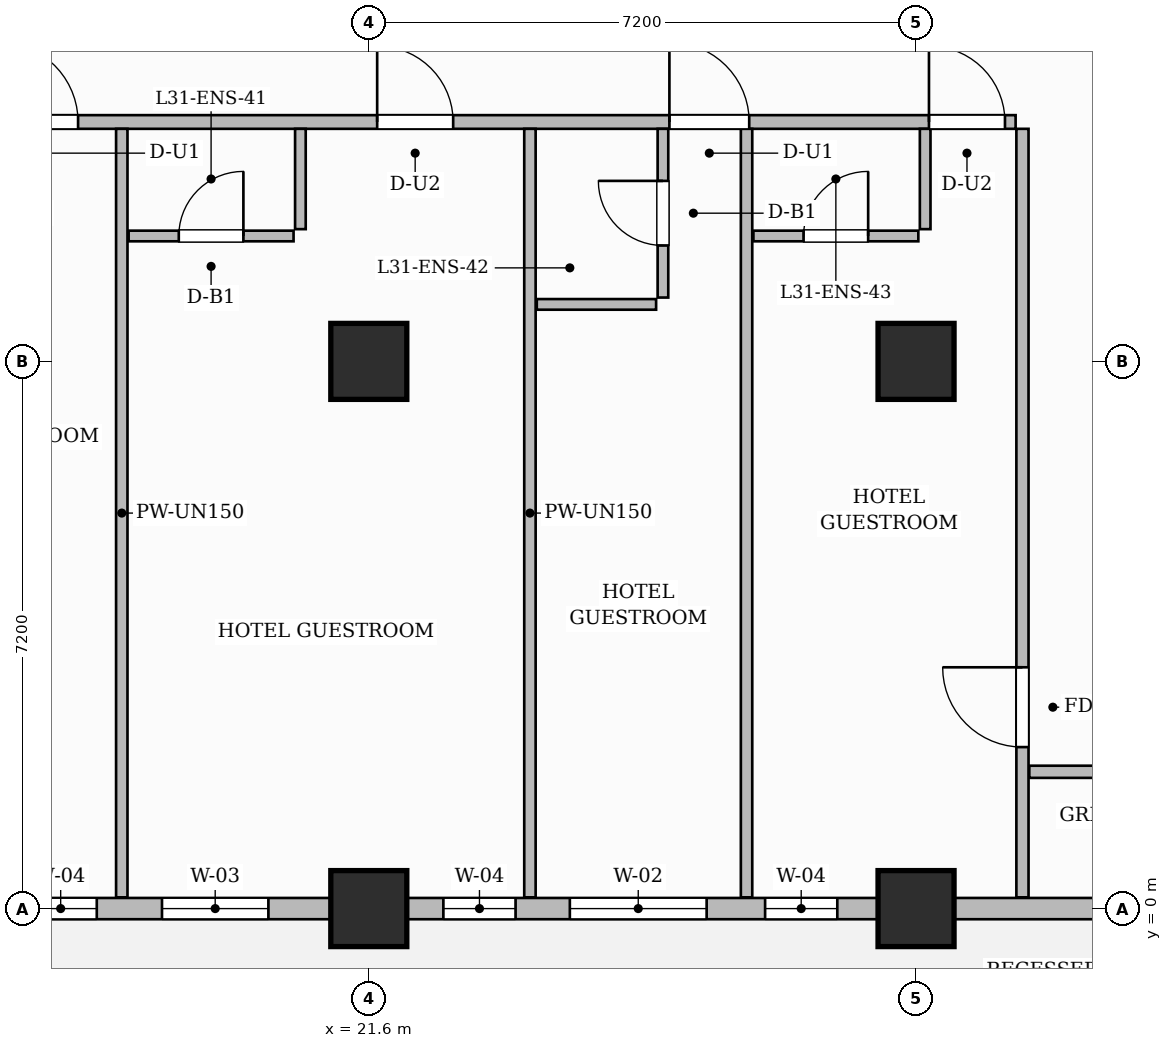
"""IFC4 building model, lengths in metres.
Left out: names, types, materials, properties, quantities, classifications, styles, units other than length and angle.
Written with IfcOpenShell. Run it as: python <this file> out.ifc"""

import sys

from ifc_helpers import new_model, si_unit, direction, frame, frame_2d, origin, origin_2d, place, context, subcontext, project, spatial, rectangle, extrude, source, transform, mapped, element, fill, save


model = new_model("IFC4")
c1 = context("Model", 3, precision=1e-05, world=origin(), true_north=direction((0.0, 1.0)))
c2 = subcontext(c1, "Body", "Model", "MODEL_VIEW")
j1 = project(units=[si_unit("LENGTHUNIT", "METRE"), si_unit("PLANEANGLEUNIT", "RADIAN")], contexts=[c1])
p1 = place(None, origin())
s1 = spatial("IfcSite", under=j1, at=p1, CompositionType="ELEMENT")
p2 = place(p1, origin())
s2 = spatial("IfcBuilding", under=s1, at=p2, CompositionType="ELEMENT")
p3 = place(p2, frame((0.0, 0.0, 126.6)))
s3 = spatial("IfcBuildingStorey", under=s2, at=p3, CompositionType="ELEMENT", Elevation=126.6)
m1 = source(origin(), c2, "Body", "SweptSolid", [
    extrude(rectangle(XDim=1.0, YDim=1.0, at=origin_2d()), origin(), (0.0, 0.0, 1.0), 3.7),
])
for number, where, z_axis, x_axis in (
    (1, (21.6, 0.0, 0.0), (0.0, 0.0, 1.0), (1.0, 0.0, 0.0)),
    (2, (21.6, 7.2, 0.0), (0.0, 0.0, 1.0), (1.0, 0.0, 0.0)),
    (3, (28.8, 0.0, 0.0), (0.0, 0.0, 1.0), (1.0, 0.0, 0.0)),
    (4, (28.8, 7.2, 0.0), (0.0, 0.0, 1.0), (1.0, 0.0, 0.0)),
):
    element("IfcColumn", number, at=place(p3, frame(where, z_axis=z_axis, x_axis=x_axis)), inside=s3, PredefinedType="COLUMN", context=c2, shape_type="MappedRepresentation", body=[
        mapped(m1, transform((0.0, 0.0, 0.0), scale=1.0)),
    ])
p4 = place(p3, frame((14.548, 10.35, 0.0), z_axis=(0.0, 0.0, 1.0), x_axis=(1.0, 0.0, 0.0)))
e5 = element("IfcWall", 5, at=p4, inside=s3, PredefinedType="PARTITIONING", context=c2, shape_type="SweptSolid", body=[
    extrude(rectangle(XDim=15.562, YDim=0.18, at=frame_2d((7.781, 0.0))), origin(), (0.0, 0.0, 1.0), 3.45),
])
p5 = place(p4, frame((2.177, 0.0, 0.0)))
e6 = element("IfcOpeningElement", 6, at=p5, cuts=e5, PredefinedType="OPENING", context=c2, shape_type="SweptSolid", body=[
    extrude(rectangle(XDim=1.05, YDim=2.25, at=frame_2d((0.525, 1.125))), frame((0.0, 0.1, 0.0), z_axis=(0.0, -1.0, 0.0), x_axis=(1.0, 0.0, 0.0)), (0.0, 0.0, 1.0), 0.2),
])
p6 = place(p4, frame((7.162, 0.0, 0.0)))
e7 = element("IfcOpeningElement", 7, at=p6, cuts=e5, PredefinedType="OPENING", context=c2, shape_type="SweptSolid", body=[
    extrude(rectangle(XDim=1.0, YDim=2.2, at=frame_2d((0.5, 1.1))), frame((0.0, 0.1, 0.0), z_axis=(0.0, -1.0, 0.0), x_axis=(1.0, 0.0, 0.0)), (0.0, 0.0, 1.0), 0.2),
])
p7 = place(p4, frame((11.007, 0.0, 0.0)))
e8 = element("IfcOpeningElement", 8, at=p7, cuts=e5, PredefinedType="OPENING", context=c2, shape_type="SweptSolid", body=[
    extrude(rectangle(XDim=1.05, YDim=2.25, at=frame_2d((0.525, 1.125))), frame((0.0, 0.1, 0.0), z_axis=(0.0, -1.0, 0.0), x_axis=(1.0, 0.0, 0.0)), (0.0, 0.0, 1.0), 0.2),
])
p8 = place(p4, frame((14.422, 0.0, 0.0)))
e9 = element("IfcOpeningElement", 9, at=p8, cuts=e5, PredefinedType="OPENING", context=c2, shape_type="SweptSolid", body=[
    extrude(rectangle(XDim=1.0, YDim=2.2, at=frame_2d((0.5, 1.1))), frame((0.0, 0.1, 0.0), z_axis=(0.0, -1.0, 0.0), x_axis=(1.0, 0.0, 0.0)), (0.0, 0.0, 1.0), 0.2),
])
p9 = place(p3, frame((30.2, 0.148, 0.0), z_axis=(0.0, 0.0, 1.0), x_axis=(0.0, 1.0, 0.0)))
e10 = element("IfcWall", 10, at=p9, inside=s3, PredefinedType="PARTITIONING", context=c2, shape_type="SweptSolid", body=[
    extrude(rectangle(XDim=10.112, YDim=0.16, at=frame_2d((5.056, 0.0))), origin(), (0.0, 0.0, 1.0), 3.45),
])
p10 = place(p9, frame((1.977, 0.0, 0.0)))
e11 = element("IfcOpeningElement", 11, at=p10, cuts=e10, PredefinedType="OPENING", context=c2, shape_type="SweptSolid", body=[
    extrude(rectangle(XDim=1.05, YDim=2.15, at=frame_2d((0.525, 1.075))), frame((0.0, 0.09, 0.0), z_axis=(0.0, -1.0, 0.0), x_axis=(1.0, 0.0, 0.0)), (0.0, 0.0, 1.0), 0.18),
])
p11 = place(p3, frame((30.29, 1.8, 0.0), z_axis=(0.0, 0.0, 1.0), x_axis=(1.0, 0.0, 0.0)))
e12 = element("IfcWall", 12, at=p11, inside=s3, PredefinedType="PARTITIONING", context=c2, shape_type="SweptSolid", body=[
    extrude(rectangle(XDim=19.37, YDim=0.16, at=frame_2d((9.685, 0.0))), origin(), (0.0, 0.0, 1.0), 3.45),
])
p12 = place(p11, frame((9.735, 0.0, 0.0)))
e13 = element("IfcOpeningElement", 13, at=p12, cuts=e12, PredefinedType="OPENING", context=c2, shape_type="SweptSolid", body=[
    extrude(rectangle(XDim=0.95, YDim=2.15, at=frame_2d((0.475, 1.075))), frame((0.0, 0.09, 0.0), z_axis=(0.0, -1.0, 0.0), x_axis=(1.0, 0.0, 0.0)), (0.0, 0.0, 1.0), 0.18),
])
p13 = place(p3, frame((18.35, 0.148, 0.0), z_axis=(0.0, 0.0, 1.0), x_axis=(0.0, 1.0, 0.0)))
e14 = element("IfcWall", 14, at=p13, inside=s3, PredefinedType="PARTITIONING", context=c2, shape_type="SweptSolid", body=[
    extrude(rectangle(XDim=10.112, YDim=0.15, at=frame_2d((5.056, 0.0))), origin(), (0.0, 0.0, 1.0), 3.45),
])
p14 = place(p3, frame((20.7, 8.94, 0.0), z_axis=(0.0, 0.0, 1.0), x_axis=(0.0, 1.0, 0.0)))
e15 = element("IfcWall", 15, at=p14, inside=s3, PredefinedType="PARTITIONING", context=c2, shape_type="SweptSolid", body=[
    extrude(rectangle(XDim=1.32, YDim=0.14, at=frame_2d((0.66, 0.0))), origin(), (0.0, 0.0, 1.0), 3.45),
])
p15 = place(p3, frame((18.44, 8.85, 0.0), z_axis=(0.0, 0.0, 1.0), x_axis=(1.0, 0.0, 0.0)))
e16 = element("IfcWall", 16, at=p15, inside=s3, PredefinedType="PARTITIONING", context=c2, shape_type="SweptSolid", body=[
    extrude(rectangle(XDim=2.17, YDim=0.14, at=frame_2d((1.085, 0.0))), origin(), (0.0, 0.0, 1.0), 3.45),
])
p16 = place(p15, frame((0.66, 0.0, 0.0)))
e17 = element("IfcOpeningElement", 17, at=p16, cuts=e16, PredefinedType="OPENING", context=c2, shape_type="SweptSolid", body=[
    extrude(rectangle(XDim=0.85, YDim=2.1, at=frame_2d((0.425, 1.05))), frame((0.0, 0.08, 0.0), z_axis=(0.0, -1.0, 0.0), x_axis=(1.0, 0.0, 0.0)), (0.0, 0.0, 1.0), 0.16),
])
p17 = place(p3, frame((23.72, 0.148, 0.0), z_axis=(0.0, 0.0, 1.0), x_axis=(0.0, 1.0, 0.0)))
e18 = element("IfcWall", 18, at=p17, inside=s3, PredefinedType="PARTITIONING", context=c2, shape_type="SweptSolid", body=[
    extrude(rectangle(XDim=10.112, YDim=0.15, at=frame_2d((5.056, 0.0))), origin(), (0.0, 0.0, 1.0), 3.45),
])
p18 = place(p3, frame((25.47, 8.04, 0.0), z_axis=(0.0, 0.0, 1.0), x_axis=(0.0, 1.0, 0.0)))
e19 = element("IfcWall", 19, at=p18, inside=s3, PredefinedType="PARTITIONING", context=c2, shape_type="SweptSolid", body=[
    extrude(rectangle(XDim=2.22, YDim=0.14, at=frame_2d((1.11, 0.0))), origin(), (0.0, 0.0, 1.0), 3.45),
])
p19 = place(p18, frame((0.685, 0.0, 0.0)))
e20 = element("IfcOpeningElement", 20, at=p19, cuts=e19, PredefinedType="OPENING", context=c2, shape_type="SweptSolid", body=[
    extrude(rectangle(XDim=0.85, YDim=2.1, at=frame_2d((0.425, 1.05))), frame((0.0, 0.08, 0.0), z_axis=(0.0, -1.0, 0.0), x_axis=(1.0, 0.0, 0.0)), (0.0, 0.0, 1.0), 0.16),
])
p20 = place(p3, frame((23.81, 7.95, 0.0), z_axis=(0.0, 0.0, 1.0), x_axis=(1.0, 0.0, 0.0)))
e21 = element("IfcWall", 21, at=p20, inside=s3, PredefinedType="PARTITIONING", context=c2, shape_type="SweptSolid", body=[
    extrude(rectangle(XDim=1.57, YDim=0.14, at=frame_2d((0.785, 0.0))), origin(), (0.0, 0.0, 1.0), 3.45),
])
p21 = place(p3, frame((26.57, 0.148, 0.0), z_axis=(0.0, 0.0, 1.0), x_axis=(0.0, 1.0, 0.0)))
e22 = element("IfcWall", 22, at=p21, inside=s3, PredefinedType="PARTITIONING", context=c2, shape_type="SweptSolid", body=[
    extrude(rectangle(XDim=10.112, YDim=0.15, at=frame_2d((5.056, 0.0))), origin(), (0.0, 0.0, 1.0), 3.45),
])
p22 = place(p3, frame((28.92, 8.94, 0.0), z_axis=(0.0, 0.0, 1.0), x_axis=(0.0, 1.0, 0.0)))
e23 = element("IfcWall", 23, at=p22, inside=s3, PredefinedType="PARTITIONING", context=c2, shape_type="SweptSolid", body=[
    extrude(rectangle(XDim=1.32, YDim=0.14, at=frame_2d((0.66, 0.0))), origin(), (0.0, 0.0, 1.0), 2.935),
])
p23 = place(p3, frame((26.66, 8.85, 0.0), z_axis=(0.0, 0.0, 1.0), x_axis=(1.0, 0.0, 0.0)))
e24 = element("IfcWall", 24, at=p23, inside=s3, PredefinedType="PARTITIONING", context=c2, shape_type="SweptSolid", body=[
    extrude(rectangle(XDim=2.17, YDim=0.14, at=frame_2d((1.085, 0.0))), origin(), (0.0, 0.0, 1.0), 3.45),
])
p24 = place(p23, frame((0.66, 0.0, 0.0)))
e25 = element("IfcOpeningElement", 25, at=p24, cuts=e24, PredefinedType="OPENING", context=c2, shape_type="SweptSolid", body=[
    extrude(rectangle(XDim=0.85, YDim=2.1, at=frame_2d((0.425, 1.05))), frame((0.0, 0.08, 0.0), z_axis=(0.0, -1.0, 0.0), x_axis=(1.0, 0.0, 0.0)), (0.0, 0.0, 1.0), 0.16),
])
p25 = place(p3, frame((14.4, 0.0, 0.0), z_axis=(0.0, 0.0, 1.0), x_axis=(1.0, 0.0, 0.0)))
e26 = element("IfcWall", 26, at=p25, inside=s3, PredefinedType="SOLIDWALL", context=c2, shape_type="SweptSolid", body=[
    extrude(rectangle(XDim=35.4, YDim=0.28, at=frame_2d((17.7, 0.0))), origin(), (0.0, 0.0, 1.0), 2.935),
])
p26 = place(p25, frame((0.85, 0.0, 0.0)))
e27 = element("IfcOpeningElement", 27, at=p26, cuts=e26, PredefinedType="OPENING", context=c2, shape_type="SweptSolid", body=[
    extrude(rectangle(XDim=1.2, YDim=2.2, at=frame_2d((0.6, 1.1))), frame((0.0, 0.15, 0.0), z_axis=(0.0, -1.0, 0.0), x_axis=(1.0, 0.0, 0.0)), (0.0, 0.0, 1.0), 0.3),
])
p27 = place(p25, frame((2.671, 0.0, 0.8)))
e28 = element("IfcOpeningElement", 28, at=p27, cuts=e26, PredefinedType="OPENING", context=c2, shape_type="SweptSolid", body=[
    extrude(rectangle(XDim=0.95, YDim=1.75, at=frame_2d((0.475, 0.875))), frame((0.0, 0.15, 0.0), z_axis=(0.0, -1.0, 0.0), x_axis=(1.0, 0.0, 0.0)), (0.0, 0.0, 1.0), 0.3),
])
p28 = place(p25, frame((4.479, 0.0, 0.8)))
e29 = element("IfcOpeningElement", 29, at=p28, cuts=e26, PredefinedType="OPENING", context=c2, shape_type="SweptSolid", body=[
    extrude(rectangle(XDim=1.4, YDim=1.85, at=frame_2d((0.7, 0.925))), frame((0.0, 0.15, 0.0), z_axis=(0.0, -1.0, 0.0), x_axis=(1.0, 0.0, 0.0)), (0.0, 0.0, 1.0), 0.3),
])
p29 = place(p25, frame((8.181, 0.0, 0.8)))
e30 = element("IfcOpeningElement", 30, at=p29, cuts=e26, PredefinedType="OPENING", context=c2, shape_type="SweptSolid", body=[
    extrude(rectangle(XDim=0.95, YDim=1.75, at=frame_2d((0.475, 0.875))), frame((0.0, 0.15, 0.0), z_axis=(0.0, -1.0, 0.0), x_axis=(1.0, 0.0, 0.0)), (0.0, 0.0, 1.0), 0.3),
])
p30 = place(p25, frame((9.845, 0.0, 0.8)))
e31 = element("IfcOpeningElement", 31, at=p30, cuts=e26, PredefinedType="OPENING", context=c2, shape_type="SweptSolid", body=[
    extrude(rectangle(XDim=1.8, YDim=1.85, at=frame_2d((0.9, 0.925))), frame((0.0, 0.15, 0.0), z_axis=(0.0, -1.0, 0.0), x_axis=(1.0, 0.0, 0.0)), (0.0, 0.0, 1.0), 0.3),
])
p31 = place(p25, frame((12.414, 0.0, 0.8)))
e32 = element("IfcOpeningElement", 32, at=p31, cuts=e26, PredefinedType="OPENING", context=c2, shape_type="SweptSolid", body=[
    extrude(rectangle(XDim=0.95, YDim=1.75, at=frame_2d((0.475, 0.875))), frame((0.0, 0.15, 0.0), z_axis=(0.0, -1.0, 0.0), x_axis=(1.0, 0.0, 0.0)), (0.0, 0.0, 1.0), 0.3),
])
p32 = place(p25, frame((16.804, 0.0, 0.8)))
e33 = element("IfcOpeningElement", 33, at=p32, cuts=e26, PredefinedType="OPENING", context=c2, shape_type="SweptSolid", body=[
    extrude(rectangle(XDim=1.8, YDim=1.85, at=frame_2d((0.9, 0.925))), frame((0.0, 0.15, 0.0), z_axis=(0.0, -1.0, 0.0), x_axis=(1.0, 0.0, 0.0)), (0.0, 0.0, 1.0), 0.3),
])
p33 = place(p25, frame((21.725, 0.0, 0.8)))
e34 = element("IfcOpeningElement", 34, at=p33, cuts=e26, PredefinedType="OPENING", context=c2, shape_type="SweptSolid", body=[
    extrude(rectangle(XDim=1.8, YDim=1.85, at=frame_2d((0.9, 0.925))), frame((0.0, 0.15, 0.0), z_axis=(0.0, -1.0, 0.0), x_axis=(1.0, 0.0, 0.0)), (0.0, 0.0, 1.0), 0.3),
])
p34 = place(p25, frame((24.475, 0.0, 0.8)))
e35 = element("IfcOpeningElement", 35, at=p34, cuts=e26, PredefinedType="OPENING", context=c2, shape_type="SweptSolid", body=[
    extrude(rectangle(XDim=1.8, YDim=1.85, at=frame_2d((0.9, 0.925))), frame((0.0, 0.15, 0.0), z_axis=(0.0, -1.0, 0.0), x_axis=(1.0, 0.0, 0.0)), (0.0, 0.0, 1.0), 0.3),
])
p35 = place(p25, frame((29.075, 0.0, 0.8)))
e36 = element("IfcOpeningElement", 36, at=p35, cuts=e26, PredefinedType="OPENING", context=c2, shape_type="SweptSolid", body=[
    extrude(rectangle(XDim=1.8, YDim=1.85, at=frame_2d((0.9, 0.925))), frame((0.0, 0.15, 0.0), z_axis=(0.0, -1.0, 0.0), x_axis=(1.0, 0.0, 0.0)), (0.0, 0.0, 1.0), 0.3),
])
p36 = place(p25, frame((32.125, 0.0, 0.8)))
e37 = element("IfcOpeningElement", 37, at=p36, cuts=e26, PredefinedType="OPENING", context=c2, shape_type="SweptSolid", body=[
    extrude(rectangle(XDim=1.8, YDim=1.85, at=frame_2d((0.9, 0.925))), frame((0.0, 0.15, 0.0), z_axis=(0.0, -1.0, 0.0), x_axis=(1.0, 0.0, 0.0)), (0.0, 0.0, 1.0), 0.3),
])
m2 = source(origin(), c2, "Body", "SweptSolid", [
    extrude(rectangle(XDim=1.05, YDim=2.15, at=frame_2d((0.525, 1.075))), frame((0.0, 0.025, 0.0), z_axis=(0.0, -1.0, 0.0), x_axis=(1.0, 0.0, 0.0)), (0.0, 0.0, 1.0), 0.05),
])
p37 = place(p10, origin())
e38 = element("IfcDoor", 38, at=p37, inside=s3, OperationType="SINGLE_SWING_RIGHT", PredefinedType="DOOR", context=c2, shape_type="MappedRepresentation", body=[
    mapped(m2, transform((0.0, 0.0, 0.0), scale=1.0)),
])
fill(e11, e38)
m3 = source(origin(), c2, "Body", "SweptSolid", [
    extrude(rectangle(XDim=1.05, YDim=2.25, at=frame_2d((0.525, 1.125))), frame((0.0, 0.025, 0.0), z_axis=(0.0, -1.0, 0.0), x_axis=(1.0, 0.0, 0.0)), (0.0, 0.0, 1.0), 0.05),
])
p38 = place(p5, origin())
e39 = element("IfcDoor", 39, at=p38, inside=s3, OperationType="SINGLE_SWING_LEFT", PredefinedType="DOOR", context=c2, shape_type="MappedRepresentation", body=[
    mapped(m3, transform((0.0, 0.0, 0.0), scale=1.0)),
])
fill(e6, e39)
m4 = source(origin(), c2, "Body", "SweptSolid", [
    extrude(rectangle(XDim=0.85, YDim=2.1, at=frame_2d((0.425, 1.05))), frame((0.0, 0.025, 0.0), z_axis=(0.0, -1.0, 0.0), x_axis=(1.0, 0.0, 0.0)), (0.0, 0.0, 1.0), 0.05),
])
p39 = place(p16, origin())
e40 = element("IfcDoor", 40, at=p39, inside=s3, OperationType="SINGLE_SWING_RIGHT", PredefinedType="DOOR", context=c2, shape_type="MappedRepresentation", body=[
    mapped(m4, transform((0.0, 0.0, 0.0), scale=1.0)),
])
fill(e17, e40)
m5 = source(origin(), c2, "Body", "SweptSolid", [
    extrude(rectangle(XDim=1.0, YDim=2.2, at=frame_2d((0.5, 1.1))), frame((0.0, 0.025, 0.0), z_axis=(0.0, -1.0, 0.0), x_axis=(1.0, 0.0, 0.0)), (0.0, 0.0, 1.0), 0.05),
])
p40 = place(p6, origin())
e41 = element("IfcDoor", 41, at=p40, inside=s3, OperationType="SINGLE_SWING_LEFT", PredefinedType="DOOR", context=c2, shape_type="MappedRepresentation", body=[
    mapped(m5, transform((0.0, 0.0, 0.0), scale=1.0)),
])
fill(e7, e41)
p41 = place(p19, origin())
e42 = element("IfcDoor", 42, at=p41, inside=s3, OperationType="SINGLE_SWING_RIGHT", PredefinedType="DOOR", context=c2, shape_type="MappedRepresentation", body=[
    mapped(m4, transform((0.0, 0.0, 0.0), scale=1.0)),
])
fill(e20, e42)
p42 = place(p7, origin())
e43 = element("IfcDoor", 43, at=p42, inside=s3, OperationType="SINGLE_SWING_LEFT", PredefinedType="DOOR", context=c2, shape_type="MappedRepresentation", body=[
    mapped(m3, transform((0.0, 0.0, 0.0), scale=1.0)),
])
fill(e8, e43)
p43 = place(p24, origin())
e44 = element("IfcDoor", 44, at=p43, inside=s3, OperationType="SINGLE_SWING_RIGHT", PredefinedType="DOOR", context=c2, shape_type="MappedRepresentation", body=[
    mapped(m4, transform((0.0, 0.0, 0.0), scale=1.0)),
])
fill(e25, e44)
p44 = place(p8, origin())
e45 = element("IfcDoor", 45, at=p44, inside=s3, OperationType="SINGLE_SWING_LEFT", PredefinedType="DOOR", context=c2, shape_type="MappedRepresentation", body=[
    mapped(m5, transform((0.0, 0.0, 0.0), scale=1.0)),
])
fill(e9, e45)
m6 = source(origin(), c2, "Body", "SweptSolid", [
    extrude(rectangle(XDim=0.95, YDim=1.75, at=frame_2d((0.475, 0.875))), frame((0.0, 0.03, 0.0), z_axis=(0.0, -1.0, 0.0), x_axis=(1.0, 0.0, 0.0)), (0.0, 0.0, 1.0), 0.06),
])
p45 = place(p27, origin())
e46 = element("IfcWindow", 46, at=p45, inside=s3, PartitioningType="SINGLE_PANEL", PredefinedType="WINDOW", context=c2, shape_type="MappedRepresentation", body=[
    mapped(m6, transform((0.0, 0.0, 0.0), scale=1.0)),
])
fill(e28, e46)
m7 = source(origin(), c2, "Body", "SweptSolid", [
    extrude(rectangle(XDim=1.4, YDim=1.85, at=frame_2d((0.7, 0.925))), frame((0.0, 0.03, 0.0), z_axis=(0.0, -1.0, 0.0), x_axis=(1.0, 0.0, 0.0)), (0.0, 0.0, 1.0), 0.06),
])
p46 = place(p28, origin())
e47 = element("IfcWindow", 47, at=p46, inside=s3, PartitioningType="SINGLE_PANEL", PredefinedType="WINDOW", context=c2, shape_type="MappedRepresentation", body=[
    mapped(m7, transform((0.0, 0.0, 0.0), scale=1.0)),
])
fill(e29, e47)
p47 = place(p29, origin())
e48 = element("IfcWindow", 48, at=p47, inside=s3, PartitioningType="SINGLE_PANEL", PredefinedType="WINDOW", context=c2, shape_type="MappedRepresentation", body=[
    mapped(m6, transform((0.0, 0.0, 0.0), scale=1.0)),
])
fill(e30, e48)
m8 = source(origin(), c2, "Body", "SweptSolid", [
    extrude(rectangle(XDim=1.8, YDim=1.85, at=frame_2d((0.9, 0.925))), frame((0.0, 0.03, 0.0), z_axis=(0.0, -1.0, 0.0), x_axis=(1.0, 0.0, 0.0)), (0.0, 0.0, 1.0), 0.06),
])
p48 = place(p30, origin())
e49 = element("IfcWindow", 49, at=p48, inside=s3, PartitioningType="DOUBLE_PANEL_VERTICAL", PredefinedType="WINDOW", context=c2, shape_type="MappedRepresentation", body=[
    mapped(m8, transform((0.0, 0.0, 0.0), scale=1.0)),
])
fill(e31, e49)
p49 = place(p31, origin())
e50 = element("IfcWindow", 50, at=p49, inside=s3, PartitioningType="SINGLE_PANEL", PredefinedType="WINDOW", context=c2, shape_type="MappedRepresentation", body=[
    mapped(m6, transform((0.0, 0.0, 0.0), scale=1.0)),
])
fill(e32, e50)
save(model, sys.argv[1])
